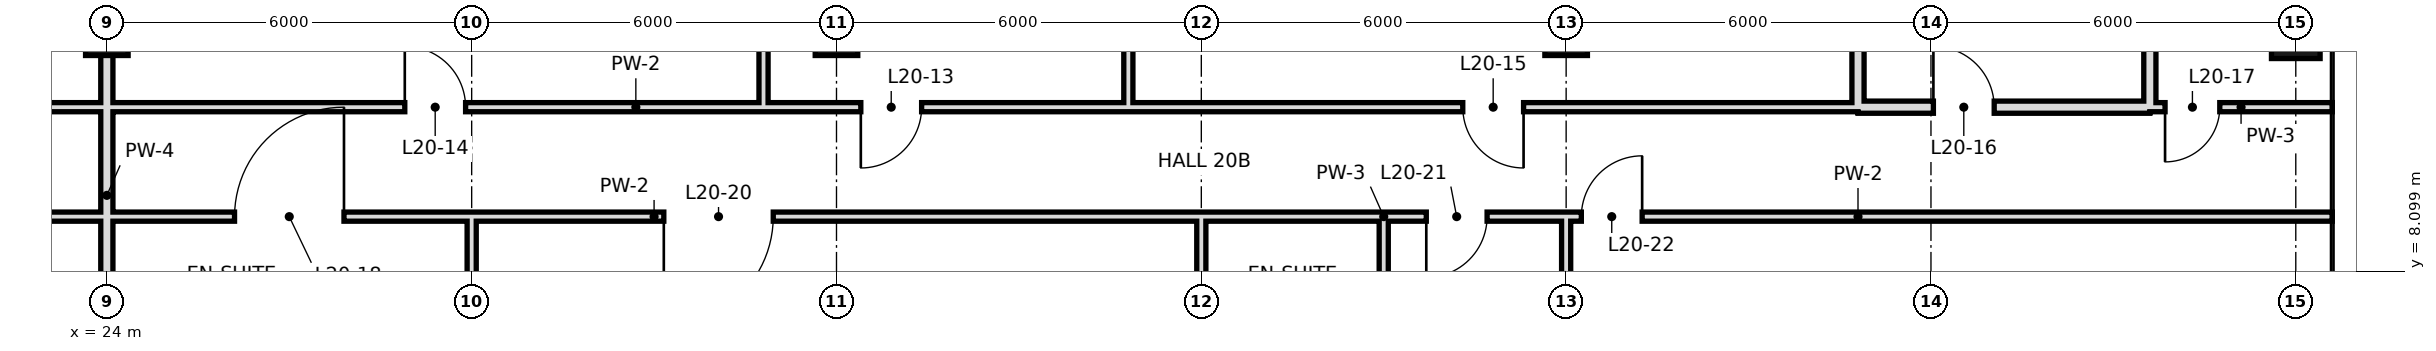
"""IFC4 building model, lengths in metres.
Left out: names, types, materials, properties, quantities, classifications, styles, units other than length and angle.
Written with IfcOpenShell. Run it as: python <this file> out.ifc"""

import sys

from ifc_helpers import new_model, si_unit, direction, frame, frame_2d, origin, origin_2d, place, context, subcontext, project, spatial, rectangle, hollow_rectangle, extrude, element, fill, save


model = new_model("IFC4")
c1 = context("Model", 3, precision=1e-05, world=origin(), true_north=direction((0.0, 1.0)))
c2 = subcontext(c1, "Body", "Model", "MODEL_VIEW")
j1 = project(units=[si_unit("LENGTHUNIT", "METRE"), si_unit("PLANEANGLEUNIT", "RADIAN")], contexts=[c1])
p1 = place(None, origin())
s1 = spatial("IfcSite", under=j1, at=p1, CompositionType="ELEMENT")
p2 = place(p1, origin())
s2 = spatial("IfcBuilding", under=s1, at=p2, CompositionType="ELEMENT")
p3 = place(p2, frame((0.0, 0.0, 96.2)))
s3 = spatial("IfcBuildingStorey", under=s2, at=p3, CompositionType="ELEMENT", Elevation=96.2)
for number, where, z_axis, x_axis in (
    (1, (24.0, 12.0, 0.0), (0.0, 0.0, 1.0), (1.0, 0.0, 0.0)),
    (2, (36.0, 12.0, 0.0), (0.0, 0.0, 1.0), (1.0, 0.0, 0.0)),
    (3, (48.0, 12.0, 0.0), (0.0, 0.0, 1.0), (1.0, 0.0, 0.0)),
):
    element("IfcColumn", number, at=place(p3, frame(where, z_axis=z_axis, x_axis=x_axis)), inside=s3, PredefinedType="COLUMN", context=c2, shape_type="SweptSolid", body=[
        extrude(hollow_rectangle(XDim=0.7, YDim=0.7, WallThickness=0.036, at=origin_2d()), origin(), (0.0, 0.0, 1.0), 3.6),
    ])
p4 = place(p3, frame((60.0, 12.0, -0.3), z_axis=(0.0, 0.0, 1.0), x_axis=(1.0, 0.0, 0.0)))
e4 = element("IfcColumn", 4, at=p4, inside=s3, PredefinedType="COLUMN", context=c2, shape_type="SweptSolid", body=[
    extrude(hollow_rectangle(XDim=0.8, YDim=0.8, WallThickness=0.04, at=origin_2d()), origin(), (0.0, 0.0, 1.0), 3.9),
])
p5 = place(p3, frame((24.0, 0.0, 0.0), z_axis=(0.0, 0.0, 1.0), x_axis=(0.0, 1.0, 0.0)))
e5 = element("IfcWall", 5, at=p5, inside=s3, PredefinedType="SOLIDWALL", context=c2, shape_type="SweptSolid", body=[
    extrude(rectangle(XDim=18.7, YDim=0.2, at=frame_2d((9.35, 0.0))), origin(), (0.0, 0.0, 1.0), 2.72),
])
p6 = place(p3, frame((30.0, -0.6, 0.0), z_axis=(0.0, 0.0, 1.0), x_axis=(0.0, 1.0, 0.0)))
e6 = element("IfcWall", 6, at=p6, inside=s3, PredefinedType="PARTITIONING", context=c2, shape_type="SweptSolid", body=[
    extrude(rectangle(XDim=9.6, YDim=0.15, at=frame_2d((4.8, 0.0))), origin(), (0.0, 0.0, 1.0), 2.72),
])
p7 = place(p6, frame((4.55, 0.0, 0.0)))
e7 = element("IfcOpeningElement", 7, at=p7, cuts=e6, PredefinedType="OPENING", context=c2, shape_type="SweptSolid", body=[
    extrude(rectangle(XDim=1.8, YDim=2.4, at=frame_2d((0.9, 1.2))), frame((0.0, 0.085, 0.0), z_axis=(0.0, -1.0, 0.0), x_axis=(1.0, 0.0, 0.0)), (0.0, 0.0, 1.0), 0.17),
])
for number, where, z_axis, x_axis in (
    (8, (34.8, 10.8, 0.0), (0.0, 0.0, 1.0), (0.0, 1.0, 0.0)),
    (9, (40.8, 10.8, 0.0), (0.0, 0.0, 1.0), (0.0, 1.0, 0.0)),
):
    element("IfcWall", number, at=place(p3, frame(where, z_axis=z_axis, x_axis=x_axis)), inside=s3, PredefinedType="PARTITIONING", context=c2, shape_type="SweptSolid", body=[
        extrude(rectangle(XDim=7.9, YDim=0.15, at=frame_2d((3.95, 0.0))), origin(), (0.0, 0.0, 1.0), 3.42),
    ])
p8 = place(p3, frame((42.0, 6.0, 0.0), z_axis=(0.0, 0.0, 1.0), x_axis=(0.0, 1.0, 0.0)))
e10 = element("IfcWall", 10, at=p8, inside=s3, PredefinedType="PARTITIONING", context=c2, shape_type="SweptSolid", body=[
    extrude(rectangle(XDim=3.0, YDim=0.15, at=frame_2d((1.5, 0.0))), origin(), (0.0, 0.0, 1.0), 2.72),
])
p9 = place(p3, frame((45.0, 6.0, 0.0), z_axis=(0.0, 0.0, 1.0), x_axis=(0.0, 1.0, 0.0)))
e11 = element("IfcWall", 11, at=p9, inside=s3, PredefinedType="PARTITIONING", context=c2, shape_type="SweptSolid", body=[
    extrude(rectangle(XDim=3.0, YDim=0.15, at=frame_2d((1.5, 0.0))), origin(), (0.0, 0.0, 1.0), 3.42),
])
p10 = place(p3, frame((48.0, 0.0, 0.0), z_axis=(0.0, 0.0, 1.0), x_axis=(0.0, 1.0, 0.0)))
e12 = element("IfcWall", 12, at=p10, inside=s3, PredefinedType="PARTITIONING", context=c2, shape_type="SweptSolid", body=[
    extrude(rectangle(XDim=9.0, YDim=0.15, at=frame_2d((4.5, 0.0))), origin(), (0.0, 0.0, 1.0), 2.72),
])
for number, where, z_axis, x_axis in (
    (13, (52.8, 10.8, 0.0), (0.0, 0.0, 1.0), (0.0, 1.0, 0.0)),
    (14, (57.6, 10.8, 0.0), (0.0, 0.0, 1.0), (0.0, 1.0, 0.0)),
):
    element("IfcWall", number, at=place(p3, frame(where, z_axis=z_axis, x_axis=x_axis)), inside=s3, PredefinedType="SOLIDWALL", context=c2, shape_type="SweptSolid", body=[
        extrude(rectangle(XDim=7.2, YDim=0.2, at=frame_2d((3.6, 0.0))), origin(), (0.0, 0.0, 1.0), 2.72),
    ])
p11 = place(p3, frame((52.8, 10.8, 0.0), z_axis=(0.0, 0.0, 1.0), x_axis=(1.0, 0.0, 0.0)))
e15 = element("IfcWall", 15, at=p11, inside=s3, PredefinedType="SOLIDWALL", context=c2, shape_type="SweptSolid", body=[
    extrude(rectangle(XDim=4.8, YDim=0.2, at=frame_2d((2.4, 0.0))), origin(), (0.0, 0.0, 1.0), 3.42),
])
p12 = place(p11, frame((1.24, 0.0, 0.0)))
e16 = element("IfcOpeningElement", 16, at=p12, cuts=e15, PredefinedType="OPENING", context=c2, shape_type="SweptSolid", body=[
    extrude(rectangle(XDim=1.0, YDim=2.4, at=frame_2d((0.5, 1.2))), frame((0.0, 0.11, 0.0), z_axis=(0.0, -1.0, 0.0), x_axis=(1.0, 0.0, 0.0)), (0.0, 0.0, 1.0), 0.22),
])
p13 = place(p3, frame((12.6, 10.8, 0.0), z_axis=(0.0, 0.0, 1.0), x_axis=(1.0, 0.0, 0.0)))
e17 = element("IfcWall", 17, at=p13, inside=s3, PredefinedType="PARTITIONING", context=c2, shape_type="SweptSolid", body=[
    extrude(rectangle(XDim=40.2, YDim=0.15, at=frame_2d((20.1, 0.0))), origin(), (0.0, 0.0, 1.0), 3.42),
])
p14 = place(p13, frame((8.5, 0.0, 0.0)))
e18 = element("IfcOpeningElement", 18, at=p14, cuts=e17, PredefinedType="OPENING", context=c2, shape_type="SweptSolid", body=[
    extrude(rectangle(XDim=1.0, YDim=2.4, at=frame_2d((0.5, 1.2))), frame((0.0, 0.085, 0.0), z_axis=(0.0, -1.0, 0.0), x_axis=(1.0, 0.0, 0.0)), (0.0, 0.0, 1.0), 0.17),
])
p15 = place(p13, frame((1.78, 0.0, 0.0)))
e19 = element("IfcOpeningElement", 19, at=p15, cuts=e17, PredefinedType="OPENING", context=c2, shape_type="SweptSolid", body=[
    extrude(rectangle(XDim=1.0, YDim=2.4, at=frame_2d((0.5, 1.2))), frame((0.0, 0.085, 0.0), z_axis=(0.0, -1.0, 0.0), x_axis=(1.0, 0.0, 0.0)), (0.0, 0.0, 1.0), 0.17),
])
p16 = place(p13, frame((23.8, 0.0, 0.0)))
e20 = element("IfcOpeningElement", 20, at=p16, cuts=e17, PredefinedType="OPENING", context=c2, shape_type="SweptSolid", body=[
    extrude(rectangle(XDim=1.0, YDim=2.4, at=frame_2d((0.5, 1.2))), frame((0.0, 0.085, 0.0), z_axis=(0.0, -1.0, 0.0), x_axis=(1.0, 0.0, 0.0)), (0.0, 0.0, 1.0), 0.17),
])
p17 = place(p13, frame((16.3, 0.0, 0.0)))
e21 = element("IfcOpeningElement", 21, at=p17, cuts=e17, PredefinedType="OPENING", context=c2, shape_type="SweptSolid", body=[
    extrude(rectangle(XDim=1.0, YDim=2.4, at=frame_2d((0.5, 1.2))), frame((0.0, 0.085, 0.0), z_axis=(0.0, -1.0, 0.0), x_axis=(1.0, 0.0, 0.0)), (0.0, 0.0, 1.0), 0.17),
])
p18 = place(p13, frame((33.7, 0.0, 0.0)))
e22 = element("IfcOpeningElement", 22, at=p18, cuts=e17, PredefinedType="OPENING", context=c2, shape_type="SweptSolid", body=[
    extrude(rectangle(XDim=1.0, YDim=2.4, at=frame_2d((0.5, 1.2))), frame((0.0, 0.085, 0.0), z_axis=(0.0, -1.0, 0.0), x_axis=(1.0, 0.0, 0.0)), (0.0, 0.0, 1.0), 0.17),
])
p19 = place(p3, frame((57.6, 10.8, 0.0), z_axis=(0.0, 0.0, 1.0), x_axis=(1.0, 0.0, 0.0)))
e23 = element("IfcWall", 23, at=p19, inside=s3, PredefinedType="PARTITIONING", context=c2, shape_type="SweptSolid", body=[
    extrude(rectangle(XDim=3.0, YDim=0.15, at=frame_2d((1.5, 0.0))), origin(), (0.0, 0.0, 1.0), 3.42),
])
p20 = place(p19, frame((0.25, 0.0, 0.0)))
e24 = element("IfcOpeningElement", 24, at=p20, cuts=e23, PredefinedType="OPENING", context=c2, shape_type="SweptSolid", body=[
    extrude(rectangle(XDim=0.9, YDim=2.4, at=frame_2d((0.45, 1.2))), frame((0.0, 0.085, 0.0), z_axis=(0.0, -1.0, 0.0), x_axis=(1.0, 0.0, 0.0)), (0.0, 0.0, 1.0), 0.17),
])
p21 = place(p3, frame((24.0, 9.0, 0.0), z_axis=(0.0, 0.0, 1.0), x_axis=(1.0, 0.0, 0.0)))
e25 = element("IfcWall", 25, at=p21, inside=s3, PredefinedType="PARTITIONING", context=c2, shape_type="SweptSolid", body=[
    extrude(rectangle(XDim=18.0, YDim=0.15, at=frame_2d((9.0, 0.0))), origin(), (0.0, 0.0, 1.0), 3.42),
])
p22 = place(p21, frame((2.1, 0.0, 0.0)))
e26 = element("IfcOpeningElement", 26, at=p22, cuts=e25, PredefinedType="OPENING", context=c2, shape_type="SweptSolid", body=[
    extrude(rectangle(XDim=1.8, YDim=2.4, at=frame_2d((0.9, 1.2))), frame((0.0, 0.085, 0.0), z_axis=(0.0, -1.0, 0.0), x_axis=(1.0, 0.0, 0.0)), (0.0, 0.0, 1.0), 0.17),
])
p23 = place(p21, frame((9.16, 0.0, 0.0)))
e27 = element("IfcOpeningElement", 27, at=p23, cuts=e25, PredefinedType="OPENING", context=c2, shape_type="SweptSolid", body=[
    extrude(rectangle(XDim=1.8, YDim=2.4, at=frame_2d((0.9, 1.2))), frame((0.0, 0.085, 0.0), z_axis=(0.0, -1.0, 0.0), x_axis=(1.0, 0.0, 0.0)), (0.0, 0.0, 1.0), 0.17),
])
p24 = place(p3, frame((45.0, 9.0, 0.0), z_axis=(0.0, 0.0, 1.0), x_axis=(1.0, 0.0, 0.0)))
e28 = element("IfcWall", 28, at=p24, inside=s3, PredefinedType="PARTITIONING", context=c2, shape_type="SweptSolid", body=[
    extrude(rectangle(XDim=15.6, YDim=0.15, at=frame_2d((7.8, 0.0))), origin(), (0.0, 0.0, 1.0), 3.42),
])
p25 = place(p24, frame((0.7, 0.0, 0.0)))
e29 = element("IfcOpeningElement", 29, at=p25, cuts=e28, PredefinedType="OPENING", context=c2, shape_type="SweptSolid", body=[
    extrude(rectangle(XDim=1.0, YDim=2.4, at=frame_2d((0.5, 1.2))), frame((0.0, 0.085, 0.0), z_axis=(0.0, -1.0, 0.0), x_axis=(1.0, 0.0, 0.0)), (0.0, 0.0, 1.0), 0.17),
])
p26 = place(p24, frame((3.25, 0.0, 0.0)))
e30 = element("IfcOpeningElement", 30, at=p26, cuts=e28, PredefinedType="OPENING", context=c2, shape_type="SweptSolid", body=[
    extrude(rectangle(XDim=1.0, YDim=2.4, at=frame_2d((0.5, 1.2))), frame((0.0, 0.085, 0.0), z_axis=(0.0, -1.0, 0.0), x_axis=(1.0, 0.0, 0.0)), (0.0, 0.0, 1.0), 0.17),
])
p27 = place(p3, frame((21.6, 9.0, 0.0), z_axis=(0.0, 0.0, 1.0), x_axis=(1.0, 0.0, 0.0)))
e31 = element("IfcWall", 31, at=p27, inside=s3, PredefinedType="PARTITIONING", context=c2, shape_type="SweptSolid", body=[
    extrude(rectangle(XDim=2.4, YDim=0.15, at=frame_2d((1.2, 0.0))), origin(), (0.0, 0.0, 1.0), 3.42),
])
p28 = place(p3, frame((42.0, 9.0, 0.0), z_axis=(0.0, 0.0, 1.0), x_axis=(1.0, 0.0, 0.0)))
e32 = element("IfcWall", 32, at=p28, inside=s3, PredefinedType="PARTITIONING", context=c2, shape_type="SweptSolid", body=[
    extrude(rectangle(XDim=3.0, YDim=0.15, at=frame_2d((1.5, 0.0))), origin(), (0.0, 0.0, 1.0), 3.42),
])
p29 = place(p16, frame((1.0, 0.0, 0.0), z_axis=(0.0, 0.0, 1.0), x_axis=(-1.0, 0.0, 0.0)))
e33 = element("IfcDoor", 33, at=p29, inside=s3, OperationType="SINGLE_SWING_RIGHT", PredefinedType="DOOR", context=c2, shape_type="SweptSolid", body=[
    extrude(rectangle(XDim=1.0, YDim=2.4, at=frame_2d((0.5, 1.2))), frame((0.0, 0.025, 0.0), z_axis=(0.0, -1.0, 0.0), x_axis=(1.0, 0.0, 0.0)), (0.0, 0.0, 1.0), 0.05),
])
fill(e20, e33)
p30 = place(p17, origin())
e34 = element("IfcDoor", 34, at=p30, inside=s3, OperationType="SINGLE_SWING_LEFT", PredefinedType="DOOR", context=c2, shape_type="SweptSolid", body=[
    extrude(rectangle(XDim=1.0, YDim=2.4, at=frame_2d((0.5, 1.2))), frame((0.0, 0.025, 0.0), z_axis=(0.0, -1.0, 0.0), x_axis=(1.0, 0.0, 0.0)), (0.0, 0.0, 1.0), 0.05),
])
fill(e21, e34)
p31 = place(p18, origin())
e35 = element("IfcDoor", 35, at=p31, inside=s3, OperationType="SINGLE_SWING_RIGHT", PredefinedType="DOOR", context=c2, shape_type="SweptSolid", body=[
    extrude(rectangle(XDim=1.0, YDim=2.4, at=frame_2d((0.5, 1.2))), frame((0.0, 0.025, 0.0), z_axis=(0.0, -1.0, 0.0), x_axis=(1.0, 0.0, 0.0)), (0.0, 0.0, 1.0), 0.05),
])
fill(e22, e35)
p32 = place(p12, origin())
e36 = element("IfcDoor", 36, at=p32, inside=s3, OperationType="SINGLE_SWING_LEFT", PredefinedType="DOOR", context=c2, shape_type="SweptSolid", body=[
    extrude(rectangle(XDim=1.0, YDim=2.4, at=frame_2d((0.5, 1.2))), frame((0.0, 0.025, 0.0), z_axis=(0.0, -1.0, 0.0), x_axis=(1.0, 0.0, 0.0)), (0.0, 0.0, 1.0), 0.05),
])
fill(e16, e36)
p33 = place(p20, frame((0.9, 0.0, 0.0), z_axis=(0.0, 0.0, 1.0), x_axis=(-1.0, 0.0, 0.0)))
e37 = element("IfcDoor", 37, at=p33, inside=s3, OperationType="SINGLE_SWING_RIGHT", PredefinedType="DOOR", context=c2, shape_type="SweptSolid", body=[
    extrude(rectangle(XDim=0.9, YDim=2.4, at=frame_2d((0.45, 1.2))), frame((0.0, 0.025, 0.0), z_axis=(0.0, -1.0, 0.0), x_axis=(1.0, 0.0, 0.0)), (0.0, 0.0, 1.0), 0.05),
])
fill(e24, e37)
p34 = place(p22, frame((1.8, 0.0, 0.0), z_axis=(0.0, 0.0, 1.0), x_axis=(-1.0, 0.0, 0.0)))
e38 = element("IfcDoor", 38, at=p34, inside=s3, OperationType="SINGLE_SWING_LEFT", PredefinedType="DOOR", context=c2, shape_type="SweptSolid", body=[
    extrude(rectangle(XDim=1.8, YDim=2.4, at=frame_2d((0.9, 1.2))), frame((0.0, 0.025, 0.0), z_axis=(0.0, -1.0, 0.0), x_axis=(1.0, 0.0, 0.0)), (0.0, 0.0, 1.0), 0.05),
])
fill(e26, e38)
p35 = place(p23, frame((1.8, 0.0, 0.0), z_axis=(0.0, 0.0, 1.0), x_axis=(-1.0, 0.0, 0.0)))
e39 = element("IfcDoor", 39, at=p35, inside=s3, OperationType="SINGLE_SWING_RIGHT", PredefinedType="DOOR", context=c2, shape_type="SweptSolid", body=[
    extrude(rectangle(XDim=1.8, YDim=2.4, at=frame_2d((0.9, 1.2))), frame((0.0, 0.025, 0.0), z_axis=(0.0, -1.0, 0.0), x_axis=(1.0, 0.0, 0.0)), (0.0, 0.0, 1.0), 0.05),
])
fill(e27, e39)
p36 = place(p25, frame((1.0, 0.0, 0.0), z_axis=(0.0, 0.0, 1.0), x_axis=(-1.0, 0.0, 0.0)))
e40 = element("IfcDoor", 40, at=p36, inside=s3, OperationType="SINGLE_SWING_RIGHT", PredefinedType="DOOR", context=c2, shape_type="SweptSolid", body=[
    extrude(rectangle(XDim=1.0, YDim=2.4, at=frame_2d((0.5, 1.2))), frame((0.0, 0.025, 0.0), z_axis=(0.0, -1.0, 0.0), x_axis=(1.0, 0.0, 0.0)), (0.0, 0.0, 1.0), 0.05),
])
fill(e29, e40)
p37 = place(p26, frame((1.0, 0.0, 0.0), z_axis=(0.0, 0.0, 1.0), x_axis=(-1.0, 0.0, 0.0)))
e41 = element("IfcDoor", 41, at=p37, inside=s3, OperationType="SINGLE_SWING_LEFT", PredefinedType="DOOR", context=c2, shape_type="SweptSolid", body=[
    extrude(rectangle(XDim=1.0, YDim=2.4, at=frame_2d((0.5, 1.2))), frame((0.0, 0.025, 0.0), z_axis=(0.0, -1.0, 0.0), x_axis=(1.0, 0.0, 0.0)), (0.0, 0.0, 1.0), 0.05),
])
fill(e30, e41)
save(model, sys.argv[1])
